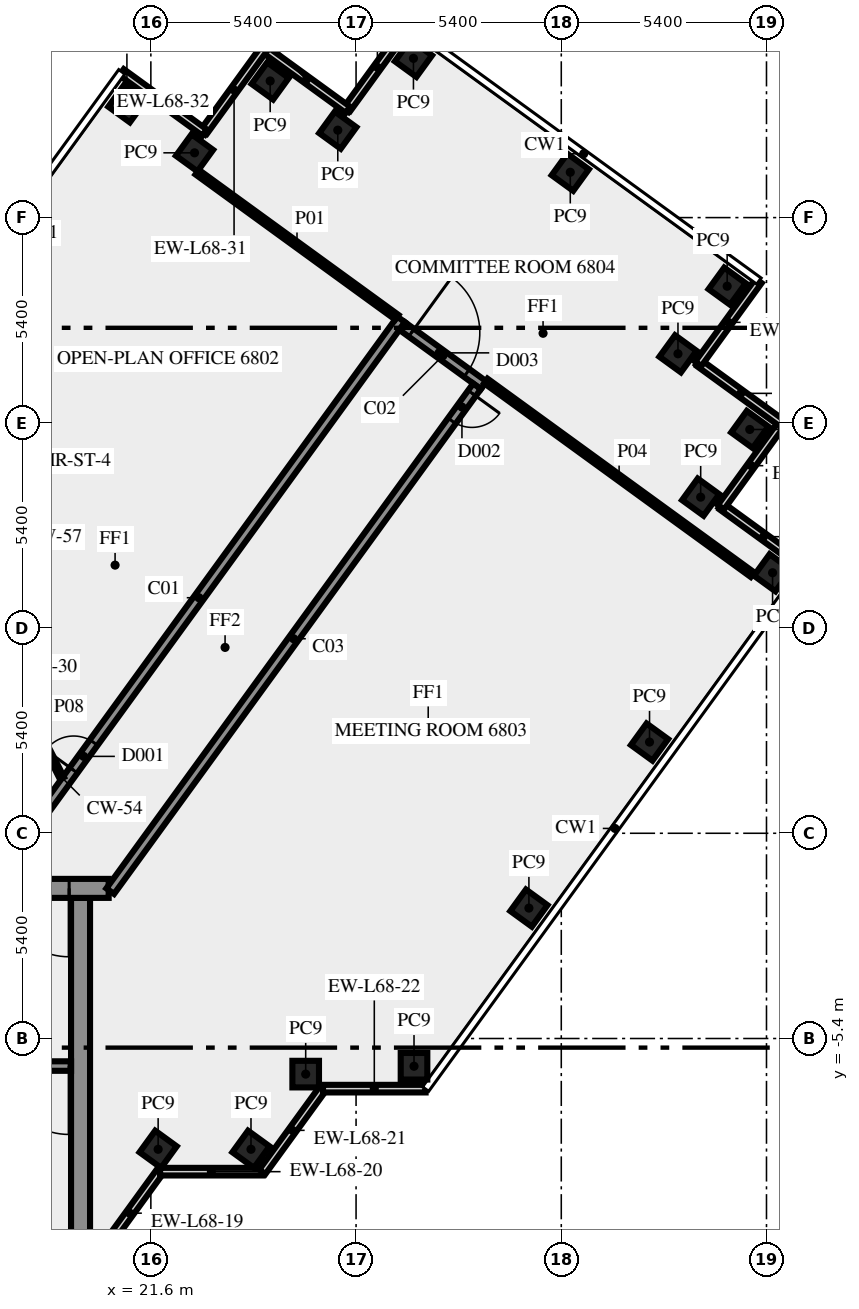
"""IFC4 building model, lengths in metres.
Left out: names, types, materials, properties, quantities, classifications, styles, units other than length and angle.
Written with IfcOpenShell. Run it as: python <this file> out.ifc"""

import sys

from ifc_helpers import new_model, si_unit, direction, frame, frame_2d, origin, origin_2d, place, context, subcontext, project, spatial, rectangle, extrude, element, fill, save


model = new_model("IFC4")
c1 = context("Model", 3, precision=1e-05, world=origin(), true_north=direction((0.0, 1.0)))
c2 = subcontext(c1, "Body", "Model", "MODEL_VIEW")
j1 = project(units=[si_unit("LENGTHUNIT", "METRE"), si_unit("PLANEANGLEUNIT", "RADIAN")], contexts=[c1])
p1 = place(None, origin())
s1 = spatial("IfcSite", under=j1, at=p1, CompositionType="ELEMENT")
p2 = place(p1, origin())
s2 = spatial("IfcBuilding", under=s1, at=p2, CompositionType="ELEMENT")
p3 = place(p2, frame((0.0, 0.0, 293.0)))
s3 = spatial("IfcBuildingStorey", under=s2, at=p3, CompositionType="ELEMENT", Elevation=293.0)
for number, where, z_axis, x_axis in (
    (1, (21.792, -8.315, 0.0), (0.0, 0.0, 1.0), (0.588, 0.809, 0.0)),
    (2, (24.235, -8.315, 0.0), (0.0, 0.0, 1.0), (0.588, 0.809, 0.0)),
    (3, (25.674, -6.337, 0.0), (0.0, 0.0, 1.0), (1.0, 0.0, 0.0)),
    (4, (28.525, -6.13, 0.0), (0.0, 0.0, 1.0), (1.0, 0.0, 0.0)),
    (5, (31.548, -1.969, 0.0), (0.0, 0.0, 1.0), (0.588, 0.809, 0.0)),
    (6, (34.722, 2.4, 0.0), (0.0, 0.0, 1.0), (0.588, 0.809, 0.0)),
    (7, (37.96, 6.855, 0.0), (0.0, 0.0, 1.0), (0.588, 0.809, 0.0)),
    (8, (36.068, 8.844, 0.0), (0.0, 0.0, 1.0), (0.588, 0.809, 0.0)),
    (9, (37.36, 10.625, 0.0), (0.0, 0.0, 1.0), (0.588, 0.809, 0.0)),
    (10, (35.471, 12.616, 0.0), (0.0, 0.0, 1.0), (-0.809, 0.588, 0.0)),
    (11, (36.765, 14.395, 0.0), (0.0, 0.0, 1.0), (-0.809, 0.588, 0.0)),
    (12, (32.637, 17.393, 0.0), (0.0, 0.0, 1.0), (-0.809, 0.588, 0.0)),
    (13, (28.51, 20.39, 0.0), (0.0, 0.0, 1.0), (-0.588, -0.809, 0.0)),
    (14, (26.519, 18.5, 0.0), (0.0, 0.0, 1.0), (-0.809, 0.588, 0.0)),
    (15, (24.74, 19.795, 0.0), (0.0, 0.0, 1.0), (-0.588, -0.809, 0.0)),
    (16, (22.749, 17.904, 0.0), (0.0, 0.0, 1.0), (-0.588, -0.809, 0.0)),
    (17, (20.97, 19.195, 0.0), (0.0, 0.0, 1.0), (-0.588, -0.809, 0.0)),
):
    element("IfcColumn", number, at=place(p3, frame(where, z_axis=z_axis, x_axis=x_axis)), inside=s3, PredefinedType="COLUMN", context=c2, shape_type="SweptSolid", body=[
        extrude(rectangle(XDim=0.7, YDim=0.7, at=origin_2d()), origin(), (0.0, 0.0, 1.0), 3.65),
    ])
p4 = place(p3, frame((20.253, -11.083, 0.0), z_axis=(0.0, 0.0, 1.0), x_axis=(0.587766567315, 0.809030569476, 0.0)))
e18 = element("IfcWall", 18, at=p4, inside=s3, PredefinedType="SOLIDWALL", context=c2, shape_type="SweptSolid", body=[
    extrude(rectangle(XDim=2.688, YDim=0.2, at=frame_2d((1.344, 0.0))), origin(), (0.0, 0.0, 1.0), 3.65),
])
p5 = place(p3, frame((21.843, -8.904, 0.0), z_axis=(0.0, 0.0, 1.0), x_axis=(1.0, 0.0, 0.0)))
e19 = element("IfcWall", 19, at=p5, inside=s3, PredefinedType="SOLIDWALL", context=c2, shape_type="SweptSolid", body=[
    extrude(rectangle(XDim=2.7, YDim=0.2, at=frame_2d((1.35, 0.0))), origin(), (0.0, 0.0, 1.0), 3.65),
])
p6 = place(p3, frame((24.533, -8.909, 0.0), z_axis=(0.0, 0.0, 1.0), x_axis=(0.587720002413, 0.809064397168, 0.0)))
e20 = element("IfcWall", 20, at=p6, inside=s3, PredefinedType="SOLIDWALL", context=c2, shape_type="SweptSolid", body=[
    extrude(rectangle(XDim=2.7, YDim=0.2, at=frame_2d((1.35, 0.0))), origin(), (0.0, 0.0, 1.0), 3.65),
])
for number, where, z_axis, x_axis in (
    (21, (26.13, -6.719, 0.0), (0.0, 0.0, 1.0), (1.0, 0.0, 0.0)),
    (22, (38.814, 7.01, 0.0), (0.0, 0.0, 1.0), (-0.809, 0.588, 0.0)),
    (23, (36.602, 8.58, 0.0), (0.0, 0.0, 1.0), (0.588, 0.809, 0.0)),
    (24, (38.216, 10.782, 0.0), (0.0, 0.0, 1.0), (-0.809, 0.588, 0.0)),
    (25, (36.005, 12.352, 0.0), (0.0, 0.0, 1.0), (0.588, 0.809, 0.0)),
):
    element("IfcWall", number, at=place(p3, frame(where, z_axis=z_axis, x_axis=x_axis)), inside=s3, PredefinedType="SOLIDWALL", context=c2, shape_type="SweptSolid", body=[
        extrude(rectangle(XDim=2.7, YDim=0.2, at=frame_2d((1.35, 0.0))), origin(), (0.0, 0.0, 1.0), 3.65),
    ])
for number, where, z_axis, x_axis in (
    (26, (28.354, 21.247, 0.0), (0.0, 0.0, 1.0), (-0.588, -0.809, 0.0)),
    (27, (26.785, 19.036, 0.0), (0.0, 0.0, 1.0), (-0.809, 0.588, 0.0)),
):
    element("IfcWall", number, at=place(p3, frame(where, z_axis=z_axis, x_axis=x_axis)), inside=s3, PredefinedType="SOLIDWALL", context=c2, shape_type="SweptSolid", body=[
        extrude(rectangle(XDim=2.7, YDim=0.2, at=frame_2d((1.35, 0.0))), origin(), (0.0, 0.0, 1.0), 3.65),
    ])
for number, where, z_axis, x_axis in (
    (28, (24.583, 20.65, 0.0), (0.0, 0.0, 1.0), (-0.588, -0.809, 0.0)),
    (29, (23.013, 18.438, 0.0), (0.0, 0.0, 1.0), (-0.809, 0.588, 0.0)),
):
    element("IfcWall", number, at=place(p3, frame(where, z_axis=z_axis, x_axis=x_axis)), inside=s3, PredefinedType="SOLIDWALL", context=c2, shape_type="SweptSolid", body=[
        extrude(rectangle(XDim=2.7, YDim=0.2, at=frame_2d((1.35, 0.0))), origin(), (0.0, 0.0, 1.0), 3.65),
    ])
p7 = place(p3, frame((19.75, -10.5, 0.0), z_axis=(0.0, 0.0, 1.0), x_axis=(0.0, 1.0, 0.0)))
e30 = element("IfcWall", 30, at=p7, inside=s3, PredefinedType="SHEAR", context=c2, shape_type="SweptSolid", body=[
    extrude(rectangle(XDim=8.8, YDim=0.5, at=frame_2d((4.4, 0.0))), origin(), (0.0, 0.0, 1.0), 3.65),
])
p8 = place(p3, frame((19.5, -6.125, 0.0), z_axis=(0.0, 0.0, 1.0), x_axis=(-1.0, 0.0, 0.0)))
e31 = element("IfcWall", 31, at=p8, inside=s3, PredefinedType="SHEAR", context=c2, shape_type="SweptSolid", body=[
    extrude(rectangle(XDim=8.05, YDim=0.25, at=frame_2d((4.025, 0.0))), origin(), (0.0, 0.0, 1.0), 3.65),
])
p9 = place(p8, frame((0.05, 0.0, 0.0)))
e32 = element("IfcOpeningElement", 32, at=p9, cuts=e31, PredefinedType="OPENING", context=c2, shape_type="SweptSolid", body=[
    extrude(rectangle(XDim=1.8, YDim=2.1, at=frame_2d((0.9, 1.05))), frame((0.0, 0.135, 0.0), z_axis=(0.0, -1.0, 0.0), x_axis=(1.0, 0.0, 0.0)), (0.0, 0.0, 1.0), 0.27),
])
p10 = place(p3, frame((20.49, -1.45, 0.0), z_axis=(0.0, 0.0, 1.0), x_axis=(-1.0, 0.0, 0.0)))
e33 = element("IfcWall", 33, at=p10, inside=s3, PredefinedType="SHEAR", context=c2, shape_type="SweptSolid", body=[
    extrude(rectangle(XDim=40.98, YDim=0.5, at=frame_2d((20.49, 0.0))), origin(), (0.0, 0.0, 1.0), 3.65),
])
p11 = place(p10, frame((38.14, 0.0, 0.0)))
e34 = element("IfcOpeningElement", 34, at=p11, cuts=e33, PredefinedType="OPENING", context=c2, shape_type="SweptSolid", body=[
    extrude(rectangle(XDim=1.8, YDim=2.1, at=frame_2d((0.9, 1.05))), frame((0.0, 0.26, 0.0), z_axis=(0.0, -1.0, 0.0), x_axis=(1.0, 0.0, 0.0)), (0.0, 0.0, 1.0), 0.52),
])
p12 = place(p10, frame((35.89, 0.0, 0.0)))
e35 = element("IfcOpeningElement", 35, at=p12, cuts=e33, PredefinedType="OPENING", context=c2, shape_type="SweptSolid", body=[
    extrude(rectangle(XDim=0.9, YDim=2.1, at=frame_2d((0.45, 1.05))), frame((0.0, 0.26, 0.0), z_axis=(0.0, -1.0, 0.0), x_axis=(1.0, 0.0, 0.0)), (0.0, 0.0, 1.0), 0.52),
])
p13 = place(p10, frame((32.94, 0.0, 0.0)))
e36 = element("IfcOpeningElement", 36, at=p13, cuts=e33, PredefinedType="OPENING", context=c2, shape_type="SweptSolid", body=[
    extrude(rectangle(XDim=0.9, YDim=2.1, at=frame_2d((0.45, 1.05))), frame((0.0, 0.26, 0.0), z_axis=(0.0, -1.0, 0.0), x_axis=(1.0, 0.0, 0.0)), (0.0, 0.0, 1.0), 0.52),
])
p14 = place(p10, frame((31.015, 0.0, 0.0)))
e37 = element("IfcOpeningElement", 37, at=p14, cuts=e33, PredefinedType="OPENING", context=c2, shape_type="SweptSolid", body=[
    extrude(rectangle(XDim=0.8, YDim=2.1, at=frame_2d((0.4, 1.05))), frame((0.0, 0.26, 0.0), z_axis=(0.0, -1.0, 0.0), x_axis=(1.0, 0.0, 0.0)), (0.0, 0.0, 1.0), 0.52),
])
p15 = place(p10, frame((24.765, 0.0, 0.0)))
e38 = element("IfcOpeningElement", 38, at=p15, cuts=e33, PredefinedType="OPENING", context=c2, shape_type="SweptSolid", body=[
    extrude(rectangle(XDim=0.8, YDim=2.1, at=frame_2d((0.4, 1.05))), frame((0.0, 0.26, 0.0), z_axis=(0.0, -1.0, 0.0), x_axis=(1.0, 0.0, 0.0)), (0.0, 0.0, 1.0), 0.52),
])
p16 = place(p10, frame((21.765, 0.0, 0.0)))
e39 = element("IfcOpeningElement", 39, at=p16, cuts=e33, PredefinedType="OPENING", context=c2, shape_type="SweptSolid", body=[
    extrude(rectangle(XDim=2.0, YDim=2.1, at=frame_2d((1.0, 1.05))), frame((0.0, 0.26, 0.0), z_axis=(0.0, -1.0, 0.0), x_axis=(1.0, 0.0, 0.0)), (0.0, 0.0, 1.0), 0.52),
])
p17 = place(p10, frame((15.202, 0.0, 0.0)))
e40 = element("IfcOpeningElement", 40, at=p17, cuts=e33, PredefinedType="OPENING", context=c2, shape_type="SweptSolid", body=[
    extrude(rectangle(XDim=0.9, YDim=2.1, at=frame_2d((0.45, 1.05))), frame((0.0, 0.26, 0.0), z_axis=(0.0, -1.0, 0.0), x_axis=(1.0, 0.0, 0.0)), (0.0, 0.0, 1.0), 0.52),
])
p18 = place(p10, frame((13.54, 0.0, 0.0)))
e41 = element("IfcOpeningElement", 41, at=p18, cuts=e33, PredefinedType="OPENING", context=c2, shape_type="SweptSolid", body=[
    extrude(rectangle(XDim=0.9, YDim=2.1, at=frame_2d((0.45, 1.05))), frame((0.0, 0.26, 0.0), z_axis=(0.0, -1.0, 0.0), x_axis=(1.0, 0.0, 0.0)), (0.0, 0.0, 1.0), 0.52),
])
p19 = place(p10, frame((11.64, 0.0, 0.0)))
e42 = element("IfcOpeningElement", 42, at=p19, cuts=e33, PredefinedType="OPENING", context=c2, shape_type="SweptSolid", body=[
    extrude(rectangle(XDim=0.9, YDim=2.1, at=frame_2d((0.45, 1.05))), frame((0.0, 0.26, 0.0), z_axis=(0.0, -1.0, 0.0), x_axis=(1.0, 0.0, 0.0)), (0.0, 0.0, 1.0), 0.52),
])
p20 = place(p10, frame((9.577, 0.0, 0.0)))
e43 = element("IfcOpeningElement", 43, at=p20, cuts=e33, PredefinedType="OPENING", context=c2, shape_type="SweptSolid", body=[
    extrude(rectangle(XDim=0.9, YDim=2.1, at=frame_2d((0.45, 1.05))), frame((0.0, 0.26, 0.0), z_axis=(0.0, -1.0, 0.0), x_axis=(1.0, 0.0, 0.0)), (0.0, 0.0, 1.0), 0.52),
])
p21 = place(p10, frame((7.14, 0.0, 0.0)))
e44 = element("IfcOpeningElement", 44, at=p21, cuts=e33, PredefinedType="OPENING", context=c2, shape_type="SweptSolid", body=[
    extrude(rectangle(XDim=0.9, YDim=2.1, at=frame_2d((0.45, 1.05))), frame((0.0, 0.26, 0.0), z_axis=(0.0, -1.0, 0.0), x_axis=(1.0, 0.0, 0.0)), (0.0, 0.0, 1.0), 0.52),
])
p22 = place(p10, frame((5.028, 0.0, 0.0)))
e45 = element("IfcOpeningElement", 45, at=p22, cuts=e33, PredefinedType="OPENING", context=c2, shape_type="SweptSolid", body=[
    extrude(rectangle(XDim=0.8, YDim=2.1, at=frame_2d((0.4, 1.05))), frame((0.0, 0.26, 0.0), z_axis=(0.0, -1.0, 0.0), x_axis=(1.0, 0.0, 0.0)), (0.0, 0.0, 1.0), 0.52),
])
p23 = place(p10, frame((3.452, 0.0, 0.0)))
e46 = element("IfcOpeningElement", 46, at=p23, cuts=e33, PredefinedType="OPENING", context=c2, shape_type="SweptSolid", body=[
    extrude(rectangle(XDim=0.8, YDim=2.1, at=frame_2d((0.4, 1.05))), frame((0.0, 0.26, 0.0), z_axis=(0.0, -1.0, 0.0), x_axis=(1.0, 0.0, 0.0)), (0.0, 0.0, 1.0), 0.52),
])
p24 = place(p10, frame((1.04, 0.0, 0.0)))
e47 = element("IfcOpeningElement", 47, at=p24, cuts=e33, PredefinedType="OPENING", context=c2, shape_type="SweptSolid", body=[
    extrude(rectangle(XDim=1.8, YDim=2.1, at=frame_2d((0.9, 1.05))), frame((0.0, 0.26, 0.0), z_axis=(0.0, -1.0, 0.0), x_axis=(1.0, 0.0, 0.0)), (0.0, 0.0, 1.0), 0.52),
])
p25 = place(p3, frame((17.545, -1.125, 0.0), z_axis=(0.0, 0.0, 1.0), x_axis=(0.58779555165, 0.809009511354, 0.0)))
e48 = element("IfcWall", 48, at=p25, inside=s3, PredefinedType="SOLIDWALL", context=c2, shape_type="SweptSolid", body=[
    extrude(rectangle(XDim=18.103, YDim=0.25, at=frame_2d((9.052, 0.0))), origin(), (0.0, 0.0, 1.0), 3.65),
])
p26 = place(p25, frame((3.441, 0.0, 0.0)))
e49 = element("IfcOpeningElement", 49, at=p26, cuts=e48, PredefinedType="OPENING", context=c2, shape_type="SweptSolid", body=[
    extrude(rectangle(XDim=0.9, YDim=2.1, at=frame_2d((0.45, 1.05))), frame((0.0, 0.135, 0.0), z_axis=(0.0, -1.0, 0.0), x_axis=(1.0, 0.0, 0.0)), (0.0, 0.0, 1.0), 0.27),
])
p27 = place(p3, frame((28.213, 13.346, 0.0), z_axis=(0.0, 0.0, 1.0), x_axis=(0.809006914995, -0.587799125119, 0.0)))
e50 = element("IfcWall", 50, at=p27, inside=s3, PredefinedType="SOLIDWALL", context=c2, shape_type="SweptSolid", body=[
    extrude(rectangle(XDim=2.65, YDim=0.25, at=frame_2d((1.325, 0.0))), origin(), (0.0, 0.0, 1.0), 3.65),
])
p28 = place(p27, frame((0.3, 0.0, 0.0)))
e51 = element("IfcOpeningElement", 51, at=p28, cuts=e50, PredefinedType="OPENING", context=c2, shape_type="SweptSolid", body=[
    extrude(rectangle(XDim=1.8, YDim=2.1, at=frame_2d((0.9, 1.05))), frame((0.0, 0.135, 0.0), z_axis=(0.0, -1.0, 0.0), x_axis=(1.0, 0.0, 0.0)), (0.0, 0.0, 1.0), 0.27),
])
p29 = place(p3, frame((30.183, 11.761, 0.0), z_axis=(0.0, 0.0, 1.0), x_axis=(-0.587781762867, -0.80901952958, 0.0)))
e52 = element("IfcWall", 52, at=p29, inside=s3, PredefinedType="SOLIDWALL", context=c2, shape_type="SweptSolid", body=[
    extrude(rectangle(XDim=16.42, YDim=0.25, at=frame_2d((8.21, 0.0))), origin(), (0.0, 0.0, 1.0), 3.65),
])
p30 = place(p29, frame((0.225, 0.0, 0.0)))
e53 = element("IfcOpeningElement", 53, at=p30, cuts=e52, PredefinedType="OPENING", context=c2, shape_type="SweptSolid", body=[
    extrude(rectangle(XDim=0.9, YDim=2.1, at=frame_2d((0.45, 1.05))), frame((0.0, 0.135, 0.0), z_axis=(0.0, -1.0, 0.0), x_axis=(1.0, 0.0, 0.0)), (0.0, 0.0, 1.0), 0.27),
])
p31 = place(p3, frame((28.073, 13.578, 0.0), z_axis=(0.0, 0.0, 1.0), x_axis=(-0.809000932727, 0.587807358619, 0.0)))
e54 = element("IfcWall", 54, at=p31, inside=s3, PredefinedType="PARTITIONING", context=c2, shape_type="SweptSolid", body=[
    extrude(rectangle(XDim=6.496, YDim=0.15, at=frame_2d((3.248, 0.0))), origin(), (0.0, 0.0, 1.0), 3.65),
])
p32 = place(p3, frame((30.415, 11.902, 0.0), z_axis=(0.0, 0.0, 1.0), x_axis=(0.809020922653, -0.587779845444, 0.0)))
e55 = element("IfcWall", 55, at=p32, inside=s3, PredefinedType="PARTITIONING", context=c2, shape_type="SweptSolid", body=[
    extrude(rectangle(XDim=8.67, YDim=0.15, at=frame_2d((4.335, 0.0))), origin(), (0.0, 0.0, 1.0), 3.65),
])
p33 = place(p3, frame((18.0, 3.925, 0.0), z_axis=(0.0, 0.0, 1.0), x_axis=(0.453950796792, -0.891026752736, 0.0)))
e56 = element("IfcWall", 56, at=p33, inside=s3, PredefinedType="PARTITIONING", context=c2, shape_type="SweptSolid", body=[
    extrude(rectangle(XDim=2.778, YDim=0.12, at=frame_2d((1.389, 0.0))), origin(), (0.0, 0.0, 1.0), 3.65),
])
p34 = place(p9, origin())
e57 = element("IfcDoor", 57, at=p34, inside=s3, OperationType="DOUBLE_DOOR_SINGLE_SWING", PredefinedType="DOOR", context=c2, shape_type="SweptSolid", body=[
    extrude(rectangle(XDim=1.8, YDim=2.1, at=frame_2d((0.9, 1.05))), frame((0.0, 0.025, 0.0), z_axis=(0.0, -1.0, 0.0), x_axis=(1.0, 0.0, 0.0)), (0.0, 0.0, 1.0), 0.05),
])
fill(e32, e57)
p35 = place(p24, origin())
e58 = element("IfcDoor", 58, at=p35, inside=s3, OperationType="DOUBLE_DOOR_SINGLE_SWING", PredefinedType="DOOR", context=c2, shape_type="SweptSolid", body=[
    extrude(rectangle(XDim=1.8, YDim=2.1, at=frame_2d((0.9, 1.05))), frame((0.0, 0.025, 0.0), z_axis=(0.0, -1.0, 0.0), x_axis=(1.0, 0.0, 0.0)), (0.0, 0.0, 1.0), 0.05),
])
fill(e47, e58)
p36 = place(p26, origin())
e59 = element("IfcDoor", 59, at=p36, inside=s3, OperationType="SINGLE_SWING_LEFT", PredefinedType="DOOR", context=c2, shape_type="SweptSolid", body=[
    extrude(rectangle(XDim=0.9, YDim=2.1, at=frame_2d((0.45, 1.05))), frame((0.0, 0.025, 0.0), z_axis=(0.0, -1.0, 0.0), x_axis=(1.0, 0.0, 0.0)), (0.0, 0.0, 1.0), 0.05),
])
fill(e49, e59)
p37 = place(p28, origin())
e60 = element("IfcDoor", 60, at=p37, inside=s3, OperationType="DOUBLE_DOOR_SINGLE_SWING", PredefinedType="DOOR", context=c2, shape_type="SweptSolid", body=[
    extrude(rectangle(XDim=1.8, YDim=2.1, at=frame_2d((0.9, 1.05))), frame((0.0, 0.025, 0.0), z_axis=(0.0, -1.0, 0.0), x_axis=(1.0, 0.0, 0.0)), (0.0, 0.0, 1.0), 0.05),
])
fill(e51, e60)
p38 = place(p30, origin())
e61 = element("IfcDoor", 61, at=p38, inside=s3, OperationType="SINGLE_SWING_LEFT", PredefinedType="DOOR", context=c2, shape_type="SweptSolid", body=[
    extrude(rectangle(XDim=0.9, YDim=2.1, at=frame_2d((0.45, 1.05))), frame((0.0, 0.025, 0.0), z_axis=(0.0, -1.0, 0.0), x_axis=(1.0, 0.0, 0.0)), (0.0, 0.0, 1.0), 0.05),
])
fill(e53, e61)
save(model, sys.argv[1])
